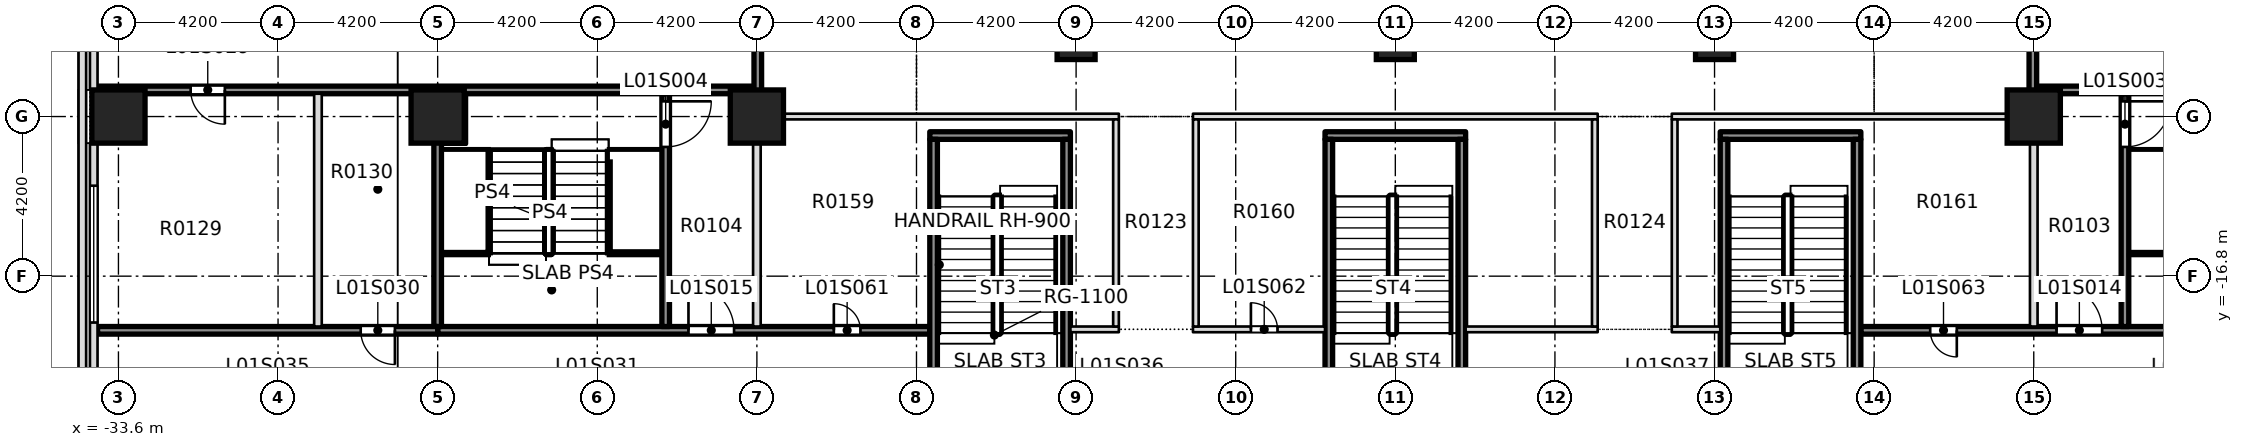
"""IFC4 building model, lengths in metres.
Left out: names, types, materials, properties, quantities, classifications, styles, units other than length and angle.
Written with IfcOpenShell. Run it as: python <this file> out.ifc"""

import sys

from ifc_helpers import new_model, si_unit, direction, frame, frame_2d, origin, origin_2d, place, context, subcontext, project, spatial, rectangle, extrude, element, fill, save


model = new_model("IFC4")
c1 = context("Model", 3, precision=1e-05, world=origin(), true_north=direction((0.0, 1.0)))
c2 = subcontext(c1, "Body", "Model", "MODEL_VIEW")
j1 = project(units=[si_unit("LENGTHUNIT", "METRE"), si_unit("PLANEANGLEUNIT", "RADIAN")], contexts=[c1])
p1 = place(None, origin())
s1 = spatial("IfcSite", under=j1, at=p1, CompositionType="ELEMENT")
p2 = place(p1, origin())
s2 = spatial("IfcBuilding", under=s1, at=p2, CompositionType="ELEMENT")
p3 = place(p2, frame((0.0, 0.0, 7.5)))
s3 = spatial("IfcBuildingStorey", under=s2, at=p3, CompositionType="ELEMENT", Elevation=7.5)
for number, where, z_axis, x_axis in (
    (1, (-25.2, -12.6, -0.4), (0.0, 0.0, 1.0), (1.0, 0.0, 0.0)),
    (2, (-16.8, -12.6, -0.4), (0.0, 0.0, 1.0), (1.0, 0.0, 0.0)),
    (3, (16.8, -12.6, -0.4), (0.0, 0.0, 1.0), (1.0, 0.0, 0.0)),
):
    element("IfcColumn", number, at=place(p3, frame(where, z_axis=z_axis, x_axis=x_axis)), inside=s3, PredefinedType="COLUMN", context=c2, shape_type="SweptSolid", body=[
        extrude(rectangle(XDim=1.4, YDim=1.4, at=origin_2d()), origin(), (0.0, 0.0, 1.0), 5.0),
    ])
for number, where, z_axis, x_axis in (
    (4, (-8.4, -10.6, -0.4), (0.0, 0.0, 1.0), (1.0, 0.0, 0.0)),
    (5, (0.0, -10.6, -0.4), (0.0, 0.0, 1.0), (1.0, 0.0, 0.0)),
    (6, (8.4, -10.6, -0.4), (0.0, 0.0, 1.0), (1.0, 0.0, 0.0)),
):
    element("IfcColumn", number, at=place(p3, frame(where, z_axis=z_axis, x_axis=x_axis)), inside=s3, PredefinedType="COLUMN", context=c2, shape_type="SweptSolid", body=[
        extrude(rectangle(XDim=1.0, YDim=1.0, at=origin_2d()), origin(), (0.0, 0.0, 1.0), 5.0),
    ])
p4 = place(p3, frame((-33.6, -12.6, 0.0), z_axis=(0.0, 0.0, 1.0), x_axis=(1.0, 0.0, 0.0)))
e7 = element("IfcColumn", 7, at=p4, inside=s3, PredefinedType="COLUMN", context=c2, shape_type="SweptSolid", body=[
    extrude(rectangle(XDim=1.4, YDim=1.4, at=origin_2d()), origin(), (0.0, 0.0, 1.0), 4.6),
])
p5 = place(p3, frame((-34.55, -30.25, 5.0), z_axis=(0.0, 0.0, 1.0), x_axis=(0.0, 1.0, 0.0)))
e8 = element("IfcWall", 8, at=p5, inside=s3, PredefinedType="PARAPET", context=c2, shape_type="SweptSolid", body=[
    extrude(rectangle(XDim=60.5, YDim=0.2, at=frame_2d((30.25, 0.0))), origin(), (0.0, 0.0, 1.0), 1.2),
])
p6 = place(p3, frame((-25.2, -18.225, 0.0), z_axis=(0.0, 0.0, 1.0), x_axis=(1.0, 0.0, 0.0)))
e9 = element("IfcWall", 9, at=p6, inside=s3, PredefinedType="SOLIDWALL", context=c2, shape_type="SweptSolid", body=[
    extrude(rectangle(XDim=12.95, YDim=0.2, at=frame_2d((6.475, 0.0))), origin(), (0.0, 0.0, 1.0), 4.6),
])
p7 = place(p6, frame((6.6, 0.0, 0.0)))
e10 = element("IfcOpeningElement", 10, at=p7, cuts=e9, PredefinedType="OPENING", context=c2, shape_type="SweptSolid", body=[
    extrude(rectangle(XDim=1.2, YDim=2.1, at=frame_2d((0.6, 1.05))), frame((0.0, 0.11, 0.0), z_axis=(0.0, -1.0, 0.0), x_axis=(1.0, 0.0, 0.0)), (0.0, 0.0, 1.0), 0.22),
])
p8 = place(p6, frame((10.425, 0.0, 0.0)))
e11 = element("IfcOpeningElement", 11, at=p8, cuts=e9, PredefinedType="OPENING", context=c2, shape_type="SweptSolid", body=[
    extrude(rectangle(XDim=0.7, YDim=2.1, at=frame_2d((0.35, 1.05))), frame((0.0, 0.11, 0.0), z_axis=(0.0, -1.0, 0.0), x_axis=(1.0, 0.0, 0.0)), (0.0, 0.0, 1.0), 0.22),
])
p9 = place(p3, frame((-8.55, -18.2, 0.0), z_axis=(0.0, 0.0, 1.0), x_axis=(1.0, 0.0, 0.0)))
e12 = element("IfcWall", 12, at=p9, inside=s3, PredefinedType="PARTITIONING", context=c2, shape_type="SweptSolid", body=[
    extrude(rectangle(XDim=1.275, YDim=0.15, at=frame_2d((0.638, 0.0))), origin(), (0.0, 0.0, 1.0), 4.6),
])
p10 = place(p3, frame((-5.325, -18.2, 0.0), z_axis=(0.0, 0.0, 1.0), x_axis=(1.0, 0.0, 0.0)))
e13 = element("IfcWall", 13, at=p10, inside=s3, PredefinedType="PARTITIONING", context=c2, shape_type="SweptSolid", body=[
    extrude(rectangle(XDim=3.475, YDim=0.15, at=frame_2d((1.737, 0.0))), origin(), (0.0, 0.0, 1.0), 4.6),
])
p11 = place(p10, frame((1.525, 0.0, 0.0)))
e14 = element("IfcOpeningElement", 14, at=p11, cuts=e13, PredefinedType="OPENING", context=c2, shape_type="SweptSolid", body=[
    extrude(rectangle(XDim=0.7, YDim=2.1, at=frame_2d((0.35, 1.05))), frame((0.0, 0.085, 0.0), z_axis=(0.0, -1.0, 0.0), x_axis=(1.0, 0.0, 0.0)), (0.0, 0.0, 1.0), 0.17),
])
p12 = place(p3, frame((1.85, -18.2, 0.0), z_axis=(0.0, 0.0, 1.0), x_axis=(1.0, 0.0, 0.0)))
e15 = element("IfcWall", 15, at=p12, inside=s3, PredefinedType="PARTITIONING", context=c2, shape_type="SweptSolid", body=[
    extrude(rectangle(XDim=3.475, YDim=0.15, at=frame_2d((1.737, 0.0))), origin(), (0.0, 0.0, 1.0), 4.6),
])
p13 = place(p3, frame((7.275, -18.2, 0.0), z_axis=(0.0, 0.0, 1.0), x_axis=(1.0, 0.0, 0.0)))
e16 = element("IfcWall", 16, at=p13, inside=s3, PredefinedType="PARTITIONING", context=c2, shape_type="SweptSolid", body=[
    extrude(rectangle(XDim=1.275, YDim=0.15, at=frame_2d((0.638, 0.0))), origin(), (0.0, 0.0, 1.0), 4.6),
])
p14 = place(p3, frame((12.25, -18.225, 0.0), z_axis=(0.0, 0.0, 1.0), x_axis=(1.0, 0.0, 0.0)))
e17 = element("IfcWall", 17, at=p14, inside=s3, PredefinedType="SOLIDWALL", context=c2, shape_type="SweptSolid", body=[
    extrude(rectangle(XDim=24.0, YDim=0.2, at=frame_2d((12.0, 0.0))), origin(), (0.0, 0.0, 1.0), 4.6),
])
p15 = place(p14, frame((5.15, 0.0, 0.0)))
e18 = element("IfcOpeningElement", 18, at=p15, cuts=e17, PredefinedType="OPENING", context=c2, shape_type="SweptSolid", body=[
    extrude(rectangle(XDim=1.2, YDim=2.1, at=frame_2d((0.6, 1.05))), frame((0.0, 0.11, 0.0), z_axis=(0.0, -1.0, 0.0), x_axis=(1.0, 0.0, 0.0)), (0.0, 0.0, 1.0), 0.22),
])
p16 = place(p14, frame((16.775, 0.0, 0.0)))
e19 = element("IfcOpeningElement", 19, at=p16, cuts=e17, PredefinedType="OPENING", context=c2, shape_type="SweptSolid", body=[
    extrude(rectangle(XDim=0.9, YDim=2.1, at=frame_2d((0.45, 1.05))), frame((0.0, 0.11, 0.0), z_axis=(0.0, -1.0, 0.0), x_axis=(1.0, 0.0, 0.0)), (0.0, 0.0, 1.0), 0.22),
])
p17 = place(p14, frame((22.25, 0.0, 0.0)))
e20 = element("IfcOpeningElement", 20, at=p17, cuts=e17, PredefinedType="OPENING", context=c2, shape_type="SweptSolid", body=[
    extrude(rectangle(XDim=0.9, YDim=2.1, at=frame_2d((0.45, 1.05))), frame((0.0, 0.11, 0.0), z_axis=(0.0, -1.0, 0.0), x_axis=(1.0, 0.0, 0.0)), (0.0, 0.0, 1.0), 0.22),
])
p18 = place(p14, frame((1.825, 0.0, 0.0)))
e21 = element("IfcOpeningElement", 21, at=p18, cuts=e17, PredefinedType="OPENING", context=c2, shape_type="SweptSolid", body=[
    extrude(rectangle(XDim=0.7, YDim=2.1, at=frame_2d((0.35, 1.05))), frame((0.0, 0.11, 0.0), z_axis=(0.0, -1.0, 0.0), x_axis=(1.0, 0.0, 0.0)), (0.0, 0.0, 1.0), 0.22),
])
p19 = place(p3, frame((-16.9, -12.6, 0.0), z_axis=(0.0, 0.0, 1.0), x_axis=(1.0, 0.0, 0.0)))
e22 = element("IfcWall", 22, at=p19, inside=s3, PredefinedType="PARTITIONING", context=c2, shape_type="SweptSolid", body=[
    extrude(rectangle(XDim=9.625, YDim=0.15, at=frame_2d((4.812, 0.0))), origin(), (0.0, 0.0, 1.0), 4.6),
])
p20 = place(p3, frame((-5.325, -12.6, 0.0), z_axis=(0.0, 0.0, 1.0), x_axis=(1.0, 0.0, 0.0)))
e23 = element("IfcWall", 23, at=p20, inside=s3, PredefinedType="PARTITIONING", context=c2, shape_type="SweptSolid", body=[
    extrude(rectangle(XDim=10.65, YDim=0.15, at=frame_2d((5.325, 0.0))), origin(), (0.0, 0.0, 1.0), 4.6),
])
p21 = place(p3, frame((7.275, -12.6, 0.0), z_axis=(0.0, 0.0, 1.0), x_axis=(1.0, 0.0, 0.0)))
e24 = element("IfcWall", 24, at=p21, inside=s3, PredefinedType="PARTITIONING", context=c2, shape_type="SweptSolid", body=[
    extrude(rectangle(XDim=9.625, YDim=0.15, at=frame_2d((4.812, 0.0))), origin(), (0.0, 0.0, 1.0), 4.6),
])
p22 = place(p3, frame((-25.2, -11.9, 0.0), z_axis=(0.0, 0.0, 1.0), x_axis=(1.0, 0.0, 0.0)))
e25 = element("IfcWall", 25, at=p22, inside=s3, PredefinedType="SOLIDWALL", context=c2, shape_type="SweptSolid", body=[
    extrude(rectangle(XDim=8.325, YDim=0.2, at=frame_2d((4.163, 0.0))), origin(), (0.0, 0.0, 1.0), 4.6),
])
p23 = place(p3, frame((-28.35, -18.125, 0.0), z_axis=(0.0, 0.0, 1.0), x_axis=(0.0, 1.0, 0.0)))
e26 = element("IfcWall", 26, at=p23, inside=s3, PredefinedType="PARTITIONING", context=c2, shape_type="SweptSolid", body=[
    extrude(rectangle(XDim=6.125, YDim=0.2, at=frame_2d((3.062, 0.0))), origin(), (0.0, 0.0, 1.0), 4.6),
])
p24 = place(p3, frame((-25.2, -18.125, 0.0), z_axis=(0.0, 0.0, 1.0), x_axis=(0.0, 1.0, 0.0)))
e27 = element("IfcWall", 27, at=p24, inside=s3, PredefinedType="SOLIDWALL", context=c2, shape_type="SweptSolid", body=[
    extrude(rectangle(XDim=6.125, YDim=0.2, at=frame_2d((3.062, 0.0))), origin(), (0.0, 0.0, 1.0), 4.6),
])
p25 = place(p3, frame((-19.2, -18.125, 0.0), z_axis=(0.0, 0.0, 1.0), x_axis=(0.0, 1.0, 0.0)))
e28 = element("IfcWall", 28, at=p25, inside=s3, PredefinedType="SOLIDWALL", context=c2, shape_type="SweptSolid", body=[
    extrude(rectangle(XDim=6.125, YDim=0.2, at=frame_2d((3.062, 0.0))), origin(), (0.0, 0.0, 1.0), 4.6),
])
p26 = place(p25, frame((4.725, 0.0, 0.0)))
e29 = element("IfcOpeningElement", 29, at=p26, cuts=e28, PredefinedType="OPENING", context=c2, shape_type="SweptSolid", body=[
    extrude(rectangle(XDim=1.2, YDim=2.1, at=frame_2d((0.6, 1.05))), frame((0.0, 0.11, 0.0), z_axis=(0.0, -1.0, 0.0), x_axis=(1.0, 0.0, 0.0)), (0.0, 0.0, 1.0), 0.22),
])
p27 = place(p3, frame((-16.8, -18.125, 0.0), z_axis=(0.0, 0.0, 1.0), x_axis=(0.0, 1.0, 0.0)))
e30 = element("IfcWall", 30, at=p27, inside=s3, PredefinedType="PARTITIONING", context=c2, shape_type="SweptSolid", body=[
    extrude(rectangle(XDim=5.45, YDim=0.2, at=frame_2d((2.725, 0.0))), origin(), (0.0, 0.0, 1.0), 4.6),
])
p28 = place(p3, frame((-16.775, -12.525, 0.0), z_axis=(0.0, 0.0, 1.0), x_axis=(-0.000727609751, 0.999999735292, 0.0)))
e31 = element("IfcWall", 31, at=p28, inside=s3, PredefinedType="SOLIDWALL", context=c2, shape_type="SweptSolid", body=[
    extrude(rectangle(XDim=34.225, YDim=0.2, at=frame_2d((17.112, 0.0))), origin(), (0.0, 0.0, 1.0), 4.6),
])
p29 = place(p28, frame((16.225, 0.0, 0.0)))
e32 = element("IfcOpeningElement", 32, at=p29, cuts=e31, PredefinedType="OPENING", context=c2, shape_type="SweptSolid", body=[
    extrude(rectangle(XDim=1.5, YDim=2.1, at=frame_2d((0.75, 1.05))), frame((0.0, 0.11, 0.0), z_axis=(0.0, -1.0, 0.0), x_axis=(1.0, 0.0, 0.0)), (0.0, 0.0, 1.0), 0.22),
])
for number, where, z_axis, x_axis in (
    (33, (-7.35, -18.125, 0.0), (0.0, 0.0, 1.0), (0.0, 1.0, 0.0)),
    (34, (-5.25, -18.125, 0.0), (0.0, 0.0, 1.0), (0.0, 1.0, 0.0)),
    (35, (5.25, -18.125, 0.0), (0.0, 0.0, 1.0), (0.0, 1.0, 0.0)),
    (36, (7.35, -18.125, 0.0), (0.0, 0.0, 1.0), (0.0, 1.0, 0.0)),
):
    element("IfcWall", number, at=place(p3, frame(where, z_axis=z_axis, x_axis=x_axis)), inside=s3, PredefinedType="PARTITIONING", context=c2, shape_type="SweptSolid", body=[
        extrude(rectangle(XDim=5.45, YDim=0.15, at=frame_2d((2.725, 0.0))), origin(), (0.0, 0.0, 1.0), 4.6),
    ])
p30 = place(p3, frame((16.8, -18.125, 0.0), z_axis=(0.0, 0.0, 1.0), x_axis=(0.0, 1.0, 0.0)))
e37 = element("IfcWall", 37, at=p30, inside=s3, PredefinedType="PARTITIONING", context=c2, shape_type="SweptSolid", body=[
    extrude(rectangle(XDim=5.45, YDim=0.2, at=frame_2d((2.725, 0.0))), origin(), (0.0, 0.0, 1.0), 4.6),
])
p31 = place(p3, frame((19.2, -18.125, 0.0), z_axis=(0.0, 0.0, 1.0), x_axis=(0.0, 1.0, 0.0)))
e38 = element("IfcWall", 38, at=p31, inside=s3, PredefinedType="SOLIDWALL", context=c2, shape_type="SweptSolid", body=[
    extrude(rectangle(XDim=6.125, YDim=0.2, at=frame_2d((3.062, 0.0))), origin(), (0.0, 0.0, 1.0), 4.6),
])
p32 = place(p31, frame((4.725, 0.0, 0.0)))
e39 = element("IfcOpeningElement", 39, at=p32, cuts=e38, PredefinedType="OPENING", context=c2, shape_type="SweptSolid", body=[
    extrude(rectangle(XDim=1.2, YDim=2.1, at=frame_2d((0.6, 1.05))), frame((0.0, 0.11, 0.0), z_axis=(0.0, -1.0, 0.0), x_axis=(1.0, 0.0, 0.0)), (0.0, 0.0, 1.0), 0.22),
])
p33 = place(p3, frame((-34.25, -4.9, 0.0), z_axis=(0.0, 0.0, 1.0), x_axis=(0.0, -1.0, 0.0)))
e40 = element("IfcWall", 40, at=p33, inside=s3, PredefinedType="STANDARD", context=c2, shape_type="SweptSolid", body=[
    extrude(rectangle(XDim=7.0, YDim=0.2, at=frame_2d((3.5, 0.0))), origin(), (0.0, 0.0, 1.0), 4.6),
])
p34 = place(p33, frame((1.7, 0.0, 0.9)))
e41 = element("IfcOpeningElement", 41, at=p34, cuts=e40, PredefinedType="OPENING", context=c2, shape_type="SweptSolid", body=[
    extrude(rectangle(XDim=3.6, YDim=2.8, at=frame_2d((1.8, 1.4))), frame((0.0, 0.11, 0.0), z_axis=(0.0, -1.0, 0.0), x_axis=(1.0, 0.0, 0.0)), (0.0, 0.0, 1.0), 0.22),
])
p35 = place(p3, frame((-34.25, -13.3, 0.0), z_axis=(0.0, 0.0, 1.0), x_axis=(0.0, -1.0, 0.0)))
e42 = element("IfcWall", 42, at=p35, inside=s3, PredefinedType="STANDARD", context=c2, shape_type="SweptSolid", body=[
    extrude(rectangle(XDim=7.0, YDim=0.2, at=frame_2d((3.5, 0.0))), origin(), (0.0, 0.0, 1.0), 4.6),
])
p36 = place(p35, frame((1.12, 0.0, 0.9)))
e43 = element("IfcOpeningElement", 43, at=p36, cuts=e42, PredefinedType="OPENING", context=c2, shape_type="SweptSolid", body=[
    extrude(rectangle(XDim=3.6, YDim=2.8, at=frame_2d((1.8, 1.4))), frame((0.0, 0.11, 0.0), z_axis=(0.0, -1.0, 0.0), x_axis=(1.0, 0.0, 0.0)), (0.0, 0.0, 1.0), 0.22),
])
p37 = place(p3, frame((-12.25, -13.1, 0.0), z_axis=(0.0, 0.0, 1.0), x_axis=(1.0, 0.0, 0.0)))
e44 = element("IfcWall", 44, at=p37, inside=s3, PredefinedType="SOLIDWALL", context=c2, shape_type="SweptSolid", body=[
    extrude(rectangle(XDim=3.7, YDim=0.2, at=frame_2d((1.85, 0.0))), origin(), (0.0, 0.0, 1.0), 4.6),
])
p38 = place(p3, frame((-12.15, -19.8, 0.0), z_axis=(0.0, 0.0, 1.0), x_axis=(0.0, 1.0, 0.0)))
e45 = element("IfcWall", 45, at=p38, inside=s3, PredefinedType="SOLIDWALL", context=c2, shape_type="SweptSolid", body=[
    extrude(rectangle(XDim=6.6, YDim=0.2, at=frame_2d((3.3, 0.0))), origin(), (0.0, 0.0, 1.0), 4.6),
])
p39 = place(p3, frame((-8.65, -20.3, 0.0), z_axis=(0.0, 0.0, 1.0), x_axis=(0.0, 1.0, 0.0)))
e46 = element("IfcWall", 46, at=p39, inside=s3, PredefinedType="SOLIDWALL", context=c2, shape_type="SweptSolid", body=[
    extrude(rectangle(XDim=7.1, YDim=0.2, at=frame_2d((3.55, 0.0))), origin(), (0.0, 0.0, 1.0), 4.6),
])
p40 = place(p3, frame((-1.85, -13.1, 0.0), z_axis=(0.0, 0.0, 1.0), x_axis=(1.0, 0.0, 0.0)))
e47 = element("IfcWall", 47, at=p40, inside=s3, PredefinedType="SOLIDWALL", context=c2, shape_type="SweptSolid", body=[
    extrude(rectangle(XDim=3.7, YDim=0.2, at=frame_2d((1.85, 0.0))), origin(), (0.0, 0.0, 1.0), 4.6),
])
for number, where, z_axis, x_axis in (
    (48, (-1.75, -19.8, 0.0), (0.0, 0.0, 1.0), (0.0, 1.0, 0.0)),
    (49, (1.75, -19.8, 0.0), (0.0, 0.0, 1.0), (0.0, 1.0, 0.0)),
):
    element("IfcWall", number, at=place(p3, frame(where, z_axis=z_axis, x_axis=x_axis)), inside=s3, PredefinedType="SOLIDWALL", context=c2, shape_type="SweptSolid", body=[
        extrude(rectangle(XDim=6.6, YDim=0.2, at=frame_2d((3.3, 0.0))), origin(), (0.0, 0.0, 1.0), 4.6),
    ])
p41 = place(p3, frame((8.55, -13.1, 0.0), z_axis=(0.0, 0.0, 1.0), x_axis=(1.0, 0.0, 0.0)))
e50 = element("IfcWall", 50, at=p41, inside=s3, PredefinedType="SOLIDWALL", context=c2, shape_type="SweptSolid", body=[
    extrude(rectangle(XDim=3.7, YDim=0.2, at=frame_2d((1.85, 0.0))), origin(), (0.0, 0.0, 1.0), 4.6),
])
p42 = place(p3, frame((8.65, -20.3, 0.0), z_axis=(0.0, 0.0, 1.0), x_axis=(0.0, 1.0, 0.0)))
e51 = element("IfcWall", 51, at=p42, inside=s3, PredefinedType="SOLIDWALL", context=c2, shape_type="SweptSolid", body=[
    extrude(rectangle(XDim=7.1, YDim=0.2, at=frame_2d((3.55, 0.0))), origin(), (0.0, 0.0, 1.0), 4.6),
])
p43 = place(p3, frame((12.15, -19.8, 0.0), z_axis=(0.0, 0.0, 1.0), x_axis=(0.0, 1.0, 0.0)))
e52 = element("IfcWall", 52, at=p43, inside=s3, PredefinedType="SOLIDWALL", context=c2, shape_type="SweptSolid", body=[
    extrude(rectangle(XDim=6.6, YDim=0.2, at=frame_2d((3.3, 0.0))), origin(), (0.0, 0.0, 1.0), 4.6),
])
p44 = place(p3, frame((-34.15, -18.225, 0.0), z_axis=(0.0, 0.0, 1.0), x_axis=(1.0, 0.0, 0.0)))
e53 = element("IfcWall", 53, at=p44, inside=s3, PredefinedType="SOLIDWALL", context=c2, shape_type="SweptSolid", body=[
    extrude(rectangle(XDim=8.95, YDim=0.2, at=frame_2d((4.475, 0.0))), origin(), (0.0, 0.0, 1.0), 4.6),
])
p45 = place(p44, frame((6.925, 0.0, 0.0)))
e54 = element("IfcOpeningElement", 54, at=p45, cuts=e53, PredefinedType="OPENING", context=c2, shape_type="SweptSolid", body=[
    extrude(rectangle(XDim=0.9, YDim=2.1, at=frame_2d((0.45, 1.05))), frame((0.0, 0.11, 0.0), z_axis=(0.0, -1.0, 0.0), x_axis=(1.0, 0.0, 0.0)), (0.0, 0.0, 1.0), 0.22),
])
p46 = place(p3, frame((16.875, -11.9, 0.0), z_axis=(0.0, 0.0, 1.0), x_axis=(1.0, 0.0, 0.0)))
e55 = element("IfcWall", 55, at=p46, inside=s3, PredefinedType="SOLIDWALL", context=c2, shape_type="SweptSolid", body=[
    extrude(rectangle(XDim=34.075, YDim=0.2, at=frame_2d((17.038, 0.0))), origin(), (0.0, 0.0, 1.0), 4.6),
])
p47 = place(p3, frame((16.775, -12.525, 0.0), z_axis=(0.0, 0.0, 1.0), x_axis=(0.000873362112, 0.999999618619, 0.0)))
e56 = element("IfcWall", 56, at=p47, inside=s3, PredefinedType="SOLIDWALL", context=c2, shape_type="SweptSolid", body=[
    extrude(rectangle(XDim=9.225, YDim=0.2, at=frame_2d((4.612, 0.0))), origin(), (0.0, 0.0, 1.0), 4.6),
])
p48 = place(p3, frame((-34.15, -11.9, 0.0), z_axis=(0.0, 0.0, 1.0), x_axis=(1.0, 0.0, 0.0)))
e57 = element("IfcWall", 57, at=p48, inside=s3, PredefinedType="SOLIDWALL", context=c2, shape_type="SweptSolid", body=[
    extrude(rectangle(XDim=8.95, YDim=0.2, at=frame_2d((4.475, 0.0))), origin(), (0.0, 0.0, 1.0), 4.6),
])
p49 = place(p48, frame((2.45, 0.0, 0.0)))
e58 = element("IfcOpeningElement", 58, at=p49, cuts=e57, PredefinedType="OPENING", context=c2, shape_type="SweptSolid", body=[
    extrude(rectangle(XDim=0.9, YDim=2.1, at=frame_2d((0.45, 1.05))), frame((0.0, 0.11, 0.0), z_axis=(0.0, -1.0, 0.0), x_axis=(1.0, 0.0, 0.0)), (0.0, 0.0, 1.0), 0.22),
])
p50 = place(p32, origin())
e59 = element("IfcDoor", 59, at=p50, inside=s3, OperationType="DOUBLE_DOOR_SINGLE_SWING", PredefinedType="DOOR", context=c2, shape_type="SweptSolid", body=[
    extrude(rectangle(XDim=1.2, YDim=2.1, at=frame_2d((0.6, 1.05))), frame((0.0, 0.025, 0.0), z_axis=(0.0, -1.0, 0.0), x_axis=(1.0, 0.0, 0.0)), (0.0, 0.0, 1.0), 0.05),
])
fill(e39, e59)
p51 = place(p26, origin())
e60 = element("IfcDoor", 60, at=p51, inside=s3, OperationType="DOUBLE_DOOR_SINGLE_SWING", PredefinedType="DOOR", context=c2, shape_type="SweptSolid", body=[
    extrude(rectangle(XDim=1.2, YDim=2.1, at=frame_2d((0.6, 1.05))), frame((0.0, 0.025, 0.0), z_axis=(0.0, -1.0, 0.0), x_axis=(1.0, 0.0, 0.0)), (0.0, 0.0, 1.0), 0.05),
])
fill(e29, e60)
p52 = place(p15, origin())
e61 = element("IfcDoor", 61, at=p52, inside=s3, OperationType="SINGLE_SWING_LEFT", PredefinedType="DOOR", context=c2, shape_type="SweptSolid", body=[
    extrude(rectangle(XDim=1.2, YDim=2.1, at=frame_2d((0.6, 1.05))), frame((0.0, 0.025, 0.0), z_axis=(0.0, -1.0, 0.0), x_axis=(1.0, 0.0, 0.0)), (0.0, 0.0, 1.0), 0.05),
])
fill(e18, e61)
p53 = place(p7, origin())
e62 = element("IfcDoor", 62, at=p53, inside=s3, OperationType="SINGLE_SWING_LEFT", PredefinedType="DOOR", context=c2, shape_type="SweptSolid", body=[
    extrude(rectangle(XDim=1.2, YDim=2.1, at=frame_2d((0.6, 1.05))), frame((0.0, 0.025, 0.0), z_axis=(0.0, -1.0, 0.0), x_axis=(1.0, 0.0, 0.0)), (0.0, 0.0, 1.0), 0.05),
])
fill(e10, e62)
p54 = place(p49, origin())
e63 = element("IfcDoor", 63, at=p54, inside=s3, OperationType="SINGLE_SWING_LEFT", PredefinedType="DOOR", context=c2, shape_type="SweptSolid", body=[
    extrude(rectangle(XDim=0.9, YDim=2.1, at=frame_2d((0.45, 1.05))), frame((0.0, 0.025, 0.0), z_axis=(0.0, -1.0, 0.0), x_axis=(1.0, 0.0, 0.0)), (0.0, 0.0, 1.0), 0.05),
])
fill(e58, e63)
p55 = place(p45, origin())
e64 = element("IfcDoor", 64, at=p55, inside=s3, OperationType="SINGLE_SWING_LEFT", PredefinedType="DOOR", context=c2, shape_type="SweptSolid", body=[
    extrude(rectangle(XDim=0.9, YDim=2.1, at=frame_2d((0.45, 1.05))), frame((0.0, 0.025, 0.0), z_axis=(0.0, -1.0, 0.0), x_axis=(1.0, 0.0, 0.0)), (0.0, 0.0, 1.0), 0.05),
])
fill(e54, e64)
p56 = place(p8, origin())
e65 = element("IfcDoor", 65, at=p56, inside=s3, OperationType="SINGLE_SWING_RIGHT", PredefinedType="DOOR", context=c2, shape_type="SweptSolid", body=[
    extrude(rectangle(XDim=0.7, YDim=2.1, at=frame_2d((0.35, 1.05))), frame((0.0, 0.025, 0.0), z_axis=(0.0, -1.0, 0.0), x_axis=(1.0, 0.0, 0.0)), (0.0, 0.0, 1.0), 0.05),
])
fill(e11, e65)
p57 = place(p11, origin())
e66 = element("IfcDoor", 66, at=p57, inside=s3, OperationType="SINGLE_SWING_LEFT", PredefinedType="DOOR", context=c2, shape_type="SweptSolid", body=[
    extrude(rectangle(XDim=0.7, YDim=2.1, at=frame_2d((0.35, 1.05))), frame((0.0, 0.025, 0.0), z_axis=(0.0, -1.0, 0.0), x_axis=(1.0, 0.0, 0.0)), (0.0, 0.0, 1.0), 0.05),
])
fill(e14, e66)
p58 = place(p18, origin())
e67 = element("IfcDoor", 67, at=p58, inside=s3, OperationType="SINGLE_SWING_LEFT", PredefinedType="DOOR", context=c2, shape_type="SweptSolid", body=[
    extrude(rectangle(XDim=0.7, YDim=2.1, at=frame_2d((0.35, 1.05))), frame((0.0, 0.025, 0.0), z_axis=(0.0, -1.0, 0.0), x_axis=(1.0, 0.0, 0.0)), (0.0, 0.0, 1.0), 0.05),
])
fill(e21, e67)
p59 = place(p36, origin())
e68 = element("IfcWindow", 68, at=p59, inside=s3, PartitioningType="SINGLE_PANEL", PredefinedType="WINDOW", context=c2, shape_type="SweptSolid", body=[
    extrude(rectangle(XDim=3.6, YDim=2.8, at=frame_2d((1.8, 1.4))), frame((0.0, 0.03, 0.0), z_axis=(0.0, -1.0, 0.0), x_axis=(1.0, 0.0, 0.0)), (0.0, 0.0, 1.0), 0.06),
])
fill(e43, e68)
save(model, sys.argv[1])
